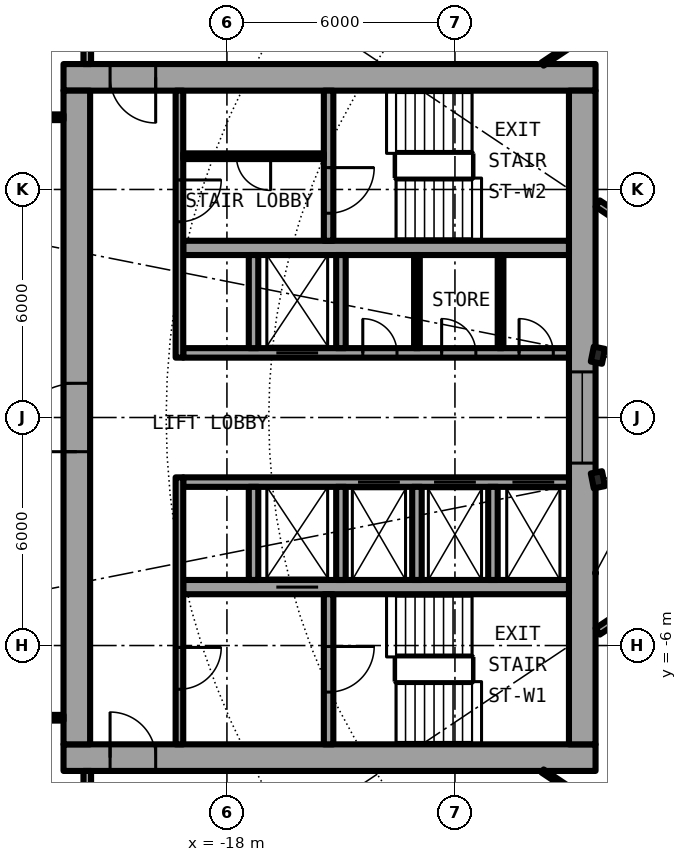
"""IFC4 building model, lengths in metres.
Left out: names, types, materials, properties, quantities, classifications, styles, units other than length and angle.
Written with IfcOpenShell. Run it as: python <this file> out.ifc"""

import sys

from ifc_helpers import new_model, si_unit, direction, frame, frame_2d, origin, origin_2d, place, context, subcontext, project, spatial, rectangle, i_section, extrude, element, fill, save


model = new_model("IFC4")
c1 = context("Model", 3, precision=1e-05, world=origin(), true_north=direction((0.0, 1.0)))
c2 = subcontext(c1, "Body", "Model", "MODEL_VIEW")
j1 = project(units=[si_unit("LENGTHUNIT", "METRE"), si_unit("PLANEANGLEUNIT", "RADIAN")], contexts=[c1])
p1 = place(None, origin())
s1 = spatial("IfcSite", under=j1, at=p1, CompositionType="ELEMENT")
p2 = place(p1, origin())
s2 = spatial("IfcBuilding", under=s1, at=p2, CompositionType="ELEMENT")
p3 = place(p2, frame((0.0, 0.0, 91.05)))
s3 = spatial("IfcBuildingStorey", under=s2, at=p3, CompositionType="ELEMENT", Elevation=91.05)
for number, where, z_axis, x_axis in (
    (1, (-8.239, 1.639, 0.0), (0.0, 0.0, 1.0), (-0.981, 0.195, 0.0)),
    (2, (-8.239, -1.639, 0.0), (0.0, 0.0, 1.0), (-0.981, -0.195, 0.0)),
):
    element("IfcColumn", number, at=place(p3, frame(where, z_axis=z_axis, x_axis=x_axis)), inside=s3, PredefinedType="COLUMN", context=c2, shape_type="SweptSolid", body=[
        extrude(i_section(OverallWidth=0.3, OverallDepth=0.4, WebThickness=0.013, FlangeThickness=0.024, FilletRadius=0.027, at=origin_2d()), origin(), (0.0, 0.0, 1.0), 3.05),
    ])
p4 = place(p3, frame((-22.3, -8.95, 0.0), z_axis=(0.0, 0.0, 1.0), x_axis=(1.0, 0.0, 0.0)))
e3 = element("IfcWall", 3, at=p4, inside=s3, PredefinedType="SHEAR", context=c2, shape_type="SweptSolid", body=[
    extrude(rectangle(XDim=14.0, YDim=0.7, at=frame_2d((7.0, 0.0))), origin(), (0.0, 0.0, 1.0), 3.05),
])
p5 = place(p4, frame((1.225, 0.0, 0.0)))
e4 = element("IfcOpeningElement", 4, at=p5, cuts=e3, PredefinedType="OPENING", context=c2, shape_type="SweptSolid", body=[
    extrude(rectangle(XDim=1.2, YDim=2.3, at=frame_2d((0.6, 1.15))), frame((0.0, 0.36, 0.0), z_axis=(0.0, -1.0, 0.0), x_axis=(1.0, 0.0, 0.0)), (0.0, 0.0, 1.0), 0.72),
])
p6 = place(p3, frame((-8.3, 8.95, 0.0), z_axis=(0.0, 0.0, 1.0), x_axis=(-1.0, 0.0, 0.0)))
e5 = element("IfcWall", 5, at=p6, inside=s3, PredefinedType="SHEAR", context=c2, shape_type="SweptSolid", body=[
    extrude(rectangle(XDim=14.0, YDim=0.7, at=frame_2d((7.0, 0.0))), origin(), (0.0, 0.0, 1.0), 3.05),
])
p7 = place(p6, frame((11.575, 0.0, 0.0)))
e6 = element("IfcOpeningElement", 6, at=p7, cuts=e5, PredefinedType="OPENING", context=c2, shape_type="SweptSolid", body=[
    extrude(rectangle(XDim=1.2, YDim=2.3, at=frame_2d((0.6, 1.15))), frame((0.0, 0.36, 0.0), z_axis=(0.0, -1.0, 0.0), x_axis=(1.0, 0.0, 0.0)), (0.0, 0.0, 1.0), 0.72),
])
p8 = place(p3, frame((-21.95, -8.6, 0.0), z_axis=(0.0, 0.0, 1.0), x_axis=(0.0, 1.0, 0.0)))
e7 = element("IfcWall", 7, at=p8, inside=s3, PredefinedType="SHEAR", context=c2, shape_type="SweptSolid", body=[
    extrude(rectangle(XDim=17.2, YDim=0.7, at=frame_2d((8.6, 0.0))), origin(), (0.0, 0.0, 1.0), 3.05),
])
p9 = place(p8, frame((7.7, 0.0, 0.0)))
e8 = element("IfcOpeningElement", 8, at=p9, cuts=e7, PredefinedType="OPENING", context=c2, shape_type="SweptSolid", body=[
    extrude(rectangle(XDim=1.8, YDim=2.3, at=frame_2d((0.9, 1.15))), frame((0.0, 0.36, 0.0), z_axis=(0.0, -1.0, 0.0), x_axis=(1.0, 0.0, 0.0)), (0.0, 0.0, 1.0), 0.72),
])
p10 = place(p3, frame((-8.65, 8.6, 0.0), z_axis=(0.0, 0.0, 1.0), x_axis=(0.0, -1.0, 0.0)))
e9 = element("IfcWall", 9, at=p10, inside=s3, PredefinedType="SHEAR", context=c2, shape_type="SweptSolid", body=[
    extrude(rectangle(XDim=17.2, YDim=0.7, at=frame_2d((8.6, 0.0))), origin(), (0.0, 0.0, 1.0), 3.05),
])
p11 = place(p10, frame((7.4, 0.0, 0.1)))
e10 = element("IfcOpeningElement", 10, at=p11, cuts=e9, PredefinedType="OPENING", context=c2, shape_type="SweptSolid", body=[
    extrude(rectangle(XDim=2.4, YDim=2.2, at=frame_2d((1.2, 1.1))), frame((0.0, 0.36, 0.0), z_axis=(0.0, -1.0, 0.0), x_axis=(1.0, 0.0, 0.0)), (0.0, 0.0, 1.0), 0.72),
])
p12 = place(p3, frame((-9.0, -1.7, 0.0), z_axis=(0.0, 0.0, 1.0), x_axis=(-1.0, 0.0, 0.0)))
e11 = element("IfcWall", 11, at=p12, inside=s3, PredefinedType="SHEAR", context=c2, shape_type="SweptSolid", body=[
    extrude(rectangle(XDim=10.15, YDim=0.25, at=frame_2d((5.075, 0.0))), origin(), (0.0, 0.0, 1.0), 3.05),
])
p13 = place(p12, frame((0.387, 0.0, 0.0)))
e12 = element("IfcOpeningElement", 12, at=p13, cuts=e11, PredefinedType="OPENING", context=c2, shape_type="SweptSolid", body=[
    extrude(rectangle(XDim=1.1, YDim=2.3, at=frame_2d((0.55, 1.15))), frame((0.0, 0.135, 0.0), z_axis=(0.0, -1.0, 0.0), x_axis=(1.0, 0.0, 0.0)), (0.0, 0.0, 1.0), 0.27),
])
p14 = place(p12, frame((2.45, 0.0, 0.0)))
e13 = element("IfcOpeningElement", 13, at=p14, cuts=e11, PredefinedType="OPENING", context=c2, shape_type="SweptSolid", body=[
    extrude(rectangle(XDim=1.1, YDim=2.3, at=frame_2d((0.55, 1.15))), frame((0.0, 0.135, 0.0), z_axis=(0.0, -1.0, 0.0), x_axis=(1.0, 0.0, 0.0)), (0.0, 0.0, 1.0), 0.27),
])
p15 = place(p12, frame((4.45, 0.0, 0.0)))
e14 = element("IfcOpeningElement", 14, at=p15, cuts=e11, PredefinedType="OPENING", context=c2, shape_type="SweptSolid", body=[
    extrude(rectangle(XDim=1.1, YDim=2.3, at=frame_2d((0.55, 1.15))), frame((0.0, 0.135, 0.0), z_axis=(0.0, -1.0, 0.0), x_axis=(1.0, 0.0, 0.0)), (0.0, 0.0, 1.0), 0.27),
])
p16 = place(p3, frame((-9.0, -4.462, 0.0), z_axis=(0.0, 0.0, 1.0), x_axis=(-1.0, 0.0, 0.0)))
e15 = element("IfcWall", 15, at=p16, inside=s3, PredefinedType="SHEAR", context=c2, shape_type="SweptSolid", body=[
    extrude(rectangle(XDim=10.15, YDim=0.375, at=frame_2d((5.075, 0.0))), origin(), (0.0, 0.0, 1.0), 3.05),
])
p17 = place(p16, frame((6.6, 0.0, 0.0)))
e16 = element("IfcOpeningElement", 16, at=p17, cuts=e15, PredefinedType="OPENING", context=c2, shape_type="SweptSolid", body=[
    extrude(rectangle(XDim=1.1, YDim=2.3, at=frame_2d((0.55, 1.15))), frame((0.0, 0.198, 0.0), z_axis=(0.0, -1.0, 0.0), x_axis=(1.0, 0.0, 0.0)), (0.0, 0.0, 1.0), 0.395),
])
p18 = place(p3, frame((-15.325, -4.65, 0.0), z_axis=(0.0, 0.0, 1.0), x_axis=(0.0, -1.0, 0.0)))
e17 = element("IfcWall", 17, at=p18, inside=s3, PredefinedType="SHEAR", context=c2, shape_type="SweptSolid", body=[
    extrude(rectangle(XDim=3.95, YDim=0.25, at=frame_2d((1.975, 0.0))), origin(), (0.0, 0.0, 1.0), 3.05),
])
p19 = place(p18, frame((1.375, 0.0, 0.0)))
e18 = element("IfcOpeningElement", 18, at=p19, cuts=e17, PredefinedType="OPENING", context=c2, shape_type="SweptSolid", body=[
    extrude(rectangle(XDim=1.2, YDim=2.3, at=frame_2d((0.6, 1.15))), frame((0.0, 0.135, 0.0), z_axis=(0.0, -1.0, 0.0), x_axis=(1.0, 0.0, 0.0)), (0.0, 0.0, 1.0), 0.27),
])
for number, where, z_axis, x_axis in (
    (19, (-15.0, -1.825, 0.0), (0.0, 0.0, 1.0), (0.0, -1.0, 0.0)),
    (20, (-17.3, -1.825, 0.0), (0.0, 0.0, 1.0), (0.0, -1.0, 0.0)),
):
    element("IfcWall", number, at=place(p3, frame(where, z_axis=z_axis, x_axis=x_axis)), inside=s3, PredefinedType="SOLIDWALL", context=c2, shape_type="SweptSolid", body=[
        extrude(rectangle(XDim=2.45, YDim=0.25, at=frame_2d((1.225, 0.0))), origin(), (0.0, 0.0, 1.0), 2.7),
    ])
p20 = place(p3, frame((-19.25, -1.575, 0.0), z_axis=(0.0, 0.0, 1.0), x_axis=(0.0, -1.0, 0.0)))
e21 = element("IfcWall", 21, at=p20, inside=s3, PredefinedType="SOLIDWALL", context=c2, shape_type="SweptSolid", body=[
    extrude(rectangle(XDim=7.025, YDim=0.2, at=frame_2d((3.513, 0.0))), origin(), (0.0, 0.0, 1.0), 2.7),
])
p21 = place(p20, frame((4.475, 0.0, 0.0)))
e22 = element("IfcOpeningElement", 22, at=p21, cuts=e21, PredefinedType="OPENING", context=c2, shape_type="SweptSolid", body=[
    extrude(rectangle(XDim=1.1, YDim=2.3, at=frame_2d((0.55, 1.15))), frame((0.0, 0.11, 0.0), z_axis=(0.0, -1.0, 0.0), x_axis=(1.0, 0.0, 0.0)), (0.0, 0.0, 1.0), 0.22),
])
p22 = place(p3, frame((-19.15, 1.7, 0.0), z_axis=(0.0, 0.0, 1.0), x_axis=(1.0, 0.0, 0.0)))
e23 = element("IfcWall", 23, at=p22, inside=s3, PredefinedType="SHEAR", context=c2, shape_type="SweptSolid", body=[
    extrude(rectangle(XDim=10.15, YDim=0.25, at=frame_2d((5.075, 0.0))), origin(), (0.0, 0.0, 1.0), 3.05),
])
p23 = place(p22, frame((2.45, 0.0, 0.0)))
e24 = element("IfcOpeningElement", 24, at=p23, cuts=e23, PredefinedType="OPENING", context=c2, shape_type="SweptSolid", body=[
    extrude(rectangle(XDim=1.1, YDim=2.3, at=frame_2d((0.55, 1.15))), frame((0.0, 0.135, 0.0), z_axis=(0.0, -1.0, 0.0), x_axis=(1.0, 0.0, 0.0)), (0.0, 0.0, 1.0), 0.27),
])
p24 = place(p22, frame((8.837, 0.0, 0.0)))
e25 = element("IfcOpeningElement", 25, at=p24, cuts=e23, PredefinedType="OPENING", context=c2, shape_type="SweptSolid", body=[
    extrude(rectangle(XDim=0.9, YDim=2.3, at=frame_2d((0.45, 1.15))), frame((0.0, 0.135, 0.0), z_axis=(0.0, -1.0, 0.0), x_axis=(1.0, 0.0, 0.0)), (0.0, 0.0, 1.0), 0.27),
])
p25 = place(p22, frame((6.8, 0.0, 0.0)))
e26 = element("IfcOpeningElement", 26, at=p25, cuts=e23, PredefinedType="OPENING", context=c2, shape_type="SweptSolid", body=[
    extrude(rectangle(XDim=0.9, YDim=2.3, at=frame_2d((0.45, 1.15))), frame((0.0, 0.135, 0.0), z_axis=(0.0, -1.0, 0.0), x_axis=(1.0, 0.0, 0.0)), (0.0, 0.0, 1.0), 0.27),
])
p26 = place(p22, frame((4.725, 0.0, 0.0)))
e27 = element("IfcOpeningElement", 27, at=p26, cuts=e23, PredefinedType="OPENING", context=c2, shape_type="SweptSolid", body=[
    extrude(rectangle(XDim=0.9, YDim=2.3, at=frame_2d((0.45, 1.15))), frame((0.0, 0.135, 0.0), z_axis=(0.0, -1.0, 0.0), x_axis=(1.0, 0.0, 0.0)), (0.0, 0.0, 1.0), 0.27),
])
p27 = place(p3, frame((-9.0, 4.462, 0.0), z_axis=(0.0, 0.0, 1.0), x_axis=(-1.0, 0.0, 0.0)))
e28 = element("IfcWall", 28, at=p27, inside=s3, PredefinedType="SHEAR", context=c2, shape_type="SweptSolid", body=[
    extrude(rectangle(XDim=10.15, YDim=0.375, at=frame_2d((5.075, 0.0))), origin(), (0.0, 0.0, 1.0), 3.05),
])
p28 = place(p3, frame((-15.325, 8.6, 0.0), z_axis=(0.0, 0.0, 1.0), x_axis=(0.0, -1.0, 0.0)))
e29 = element("IfcWall", 29, at=p28, inside=s3, PredefinedType="SHEAR", context=c2, shape_type="SweptSolid", body=[
    extrude(rectangle(XDim=3.95, YDim=0.25, at=frame_2d((1.975, 0.0))), origin(), (0.0, 0.0, 1.0), 3.05),
])
p29 = place(p28, frame((2.025, 0.0, 0.0)))
e30 = element("IfcOpeningElement", 30, at=p29, cuts=e29, PredefinedType="OPENING", context=c2, shape_type="SweptSolid", body=[
    extrude(rectangle(XDim=1.2, YDim=2.3, at=frame_2d((0.6, 1.15))), frame((0.0, 0.135, 0.0), z_axis=(0.0, -1.0, 0.0), x_axis=(1.0, 0.0, 0.0)), (0.0, 0.0, 1.0), 0.27),
])
for number, where, z_axis, x_axis in (
    (31, (-15.0, 1.825, 0.0), (0.0, 0.0, 1.0), (0.0, 1.0, 0.0)),
    (32, (-17.3, 1.825, 0.0), (0.0, 0.0, 1.0), (0.0, 1.0, 0.0)),
):
    element("IfcWall", number, at=place(p3, frame(where, z_axis=z_axis, x_axis=x_axis)), inside=s3, PredefinedType="SOLIDWALL", context=c2, shape_type="SweptSolid", body=[
        extrude(rectangle(XDim=2.45, YDim=0.25, at=frame_2d((1.225, 0.0))), origin(), (0.0, 0.0, 1.0), 2.7),
    ])
p30 = place(p3, frame((-19.25, 8.6, 0.0), z_axis=(0.0, 0.0, 1.0), x_axis=(0.0, -1.0, 0.0)))
e33 = element("IfcWall", 33, at=p30, inside=s3, PredefinedType="SOLIDWALL", context=c2, shape_type="SweptSolid", body=[
    extrude(rectangle(XDim=7.025, YDim=0.2, at=frame_2d((3.513, 0.0))), origin(), (0.0, 0.0, 1.0), 2.7),
])
p31 = place(p30, frame((2.35, 0.0, 0.0)))
e34 = element("IfcOpeningElement", 34, at=p31, cuts=e33, PredefinedType="OPENING", context=c2, shape_type="SweptSolid", body=[
    extrude(rectangle(XDim=1.1, YDim=2.3, at=frame_2d((0.55, 1.15))), frame((0.0, 0.11, 0.0), z_axis=(0.0, -1.0, 0.0), x_axis=(1.0, 0.0, 0.0)), (0.0, 0.0, 1.0), 0.22),
])
for number, where, z_axis, x_axis in (
    (35, (-11.0, -1.825, 0.0), (0.0, 0.0, 1.0), (0.0, -1.0, 0.0)),
    (36, (-13.0, -1.825, 0.0), (0.0, 0.0, 1.0), (0.0, -1.0, 0.0)),
):
    element("IfcWall", number, at=place(p3, frame(where, z_axis=z_axis, x_axis=x_axis)), inside=s3, PredefinedType="SOLIDWALL", context=c2, shape_type="SweptSolid", body=[
        extrude(rectangle(XDim=2.45, YDim=0.25, at=frame_2d((1.225, 0.0))), origin(), (0.0, 0.0, 1.0), 2.7),
    ])
for number, where, z_axis, x_axis in (
    (37, (-10.8, 1.825, 0.0), (0.0, 0.0, 1.0), (0.0, 1.0, 0.0)),
    (38, (-13.0, 1.825, 0.0), (0.0, 0.0, 1.0), (0.0, 1.0, 0.0)),
):
    element("IfcWall", number, at=place(p3, frame(where, z_axis=z_axis, x_axis=x_axis)), inside=s3, PredefinedType="PARTITIONING", context=c2, shape_type="SweptSolid", body=[
        extrude(rectangle(XDim=2.45, YDim=0.15, at=frame_2d((1.225, 0.0))), origin(), (0.0, 0.0, 1.0), 2.7),
    ])
p32 = place(p3, frame((-15.45, 6.875, 0.0), z_axis=(0.0, 0.0, 1.0), x_axis=(-1.0, 0.0, 0.0)))
e39 = element("IfcWall", 39, at=p32, inside=s3, PredefinedType="PARTITIONING", context=c2, shape_type="SweptSolid", body=[
    extrude(rectangle(XDim=3.7, YDim=0.15, at=frame_2d((1.85, 0.0))), origin(), (0.0, 0.0, 1.0), 2.7),
])
p33 = place(p32, frame((1.4, 0.0, 0.0)))
e40 = element("IfcOpeningElement", 40, at=p33, cuts=e39, PredefinedType="OPENING", context=c2, shape_type="SweptSolid", body=[
    extrude(rectangle(XDim=0.9, YDim=2.3, at=frame_2d((0.45, 1.15))), frame((0.0, 0.085, 0.0), z_axis=(0.0, -1.0, 0.0), x_axis=(1.0, 0.0, 0.0)), (0.0, 0.0, 1.0), 0.17),
])
for number, where, z_axis, x_axis in (
    (41, (-22.3, 7.9, 0.0), (0.0, 0.0, 1.0), (-1.0, 0.0, 0.0)),
    (42, (-22.3, -7.9, 0.0), (0.0, 0.0, 1.0), (-1.0, 0.0, 0.0)),
):
    element("IfcWall", number, at=place(p3, frame(where, z_axis=z_axis, x_axis=x_axis)), inside=s3, PredefinedType="PARTITIONING", context=c2, shape_type="SweptSolid", body=[
        extrude(rectangle(XDim=2.64, YDim=0.15, at=frame_2d((1.32, 0.0))), origin(), (0.0, 0.0, 1.0), 2.7),
    ])
p34 = place(p3, frame((-9.693, -9.302, 0.0), z_axis=(0.0, 0.0, 1.0), x_axis=(0.831546497949, -0.555455148278, 0.0)))
e43 = element("IfcWall", 43, at=p34, inside=s3, PredefinedType="PARTITIONING", context=c2, shape_type="SweptSolid", body=[
    extrude(rectangle(XDim=4.252, YDim=0.1, at=frame_2d((2.126, 0.0))), origin(), (0.0, 0.0, 1.0), 2.7),
])
for number, where, z_axis, x_axis in (
    (44, (-6.513, -4.472, 0.0), (0.0, 0.0, 1.0), (-0.831, -0.556, 0.0)),
    (45, (-6.513, 4.472, 0.0), (0.0, 0.0, 1.0), (-0.831, 0.556, 0.0)),
):
    element("IfcWall", number, at=place(p3, frame(where, z_axis=z_axis, x_axis=x_axis)), inside=s3, PredefinedType="PARTITIONING", context=c2, shape_type="SweptSolid", body=[
        extrude(rectangle(XDim=2.082, YDim=0.2, at=frame_2d((1.041, 0.0))), origin(), (0.0, 0.0, 1.0), 2.7),
    ])
p35 = place(p3, frame((-9.695, 9.3, 0.0), z_axis=(0.0, 0.0, 1.0), x_axis=(0.831369521678, 0.555720000022, 0.0)))
e46 = element("IfcWall", 46, at=p35, inside=s3, PredefinedType="PARTITIONING", context=c2, shape_type="SweptSolid", body=[
    extrude(rectangle(XDim=4.252, YDim=0.1, at=frame_2d((2.126, 0.0))), origin(), (0.0, 0.0, 1.0), 2.7),
])
for number, where, z_axis, x_axis in (
    (47, (-21.675, -10.95, 0.0), (0.0, 0.0, 1.0), (0.0, 1.0, 0.0)),
    (48, (-21.675, 9.3, 0.0), (0.0, 0.0, 1.0), (0.0, 1.0, 0.0)),
):
    element("IfcWall", number, at=place(p3, frame(where, z_axis=z_axis, x_axis=x_axis)), inside=s3, PredefinedType="PARTITIONING", context=c2, shape_type="SweptSolid", body=[
        extrude(rectangle(XDim=1.65, YDim=0.2, at=frame_2d((0.825, 0.0))), origin(), (0.0, 0.0, 1.0), 2.7),
    ])
p36 = place(p13, origin())
e49 = element("IfcDoor", 49, at=p36, inside=s3, OperationType="DOUBLE_DOOR_SLIDING", PredefinedType="DOOR", context=c2, shape_type="SweptSolid", body=[
    extrude(rectangle(XDim=1.1, YDim=2.3, at=frame_2d((0.55, 1.15))), frame((0.0, 0.025, 0.0), z_axis=(0.0, -1.0, 0.0), x_axis=(1.0, 0.0, 0.0)), (0.0, 0.0, 1.0), 0.05),
])
fill(e12, e49)
p37 = place(p14, origin())
e50 = element("IfcDoor", 50, at=p37, inside=s3, OperationType="DOUBLE_DOOR_SLIDING", PredefinedType="DOOR", context=c2, shape_type="SweptSolid", body=[
    extrude(rectangle(XDim=1.1, YDim=2.3, at=frame_2d((0.55, 1.15))), frame((0.0, 0.025, 0.0), z_axis=(0.0, -1.0, 0.0), x_axis=(1.0, 0.0, 0.0)), (0.0, 0.0, 1.0), 0.05),
])
fill(e13, e50)
p38 = place(p15, origin())
e51 = element("IfcDoor", 51, at=p38, inside=s3, OperationType="DOUBLE_DOOR_SLIDING", PredefinedType="DOOR", context=c2, shape_type="SweptSolid", body=[
    extrude(rectangle(XDim=1.1, YDim=2.3, at=frame_2d((0.55, 1.15))), frame((0.0, 0.025, 0.0), z_axis=(0.0, -1.0, 0.0), x_axis=(1.0, 0.0, 0.0)), (0.0, 0.0, 1.0), 0.05),
])
fill(e14, e51)
p39 = place(p17, origin())
e52 = element("IfcDoor", 52, at=p39, inside=s3, OperationType="DOUBLE_DOOR_SLIDING", PredefinedType="DOOR", context=c2, shape_type="SweptSolid", body=[
    extrude(rectangle(XDim=1.1, YDim=2.3, at=frame_2d((0.55, 1.15))), frame((0.0, 0.025, 0.0), z_axis=(0.0, -1.0, 0.0), x_axis=(1.0, 0.0, 0.0)), (0.0, 0.0, 1.0), 0.05),
])
fill(e16, e52)
p40 = place(p23, origin())
e53 = element("IfcDoor", 53, at=p40, inside=s3, OperationType="DOUBLE_DOOR_SLIDING", PredefinedType="DOOR", context=c2, shape_type="SweptSolid", body=[
    extrude(rectangle(XDim=1.1, YDim=2.3, at=frame_2d((0.55, 1.15))), frame((0.0, 0.025, 0.0), z_axis=(0.0, -1.0, 0.0), x_axis=(1.0, 0.0, 0.0)), (0.0, 0.0, 1.0), 0.05),
])
fill(e24, e53)
p41 = place(p24, origin())
e54 = element("IfcDoor", 54, at=p41, inside=s3, OperationType="SINGLE_SWING_LEFT", PredefinedType="DOOR", context=c2, shape_type="SweptSolid", body=[
    extrude(rectangle(XDim=0.9, YDim=2.3, at=frame_2d((0.45, 1.15))), frame((0.0, 0.025, 0.0), z_axis=(0.0, -1.0, 0.0), x_axis=(1.0, 0.0, 0.0)), (0.0, 0.0, 1.0), 0.05),
])
fill(e25, e54)
p42 = place(p25, origin())
e55 = element("IfcDoor", 55, at=p42, inside=s3, OperationType="SINGLE_SWING_LEFT", PredefinedType="DOOR", context=c2, shape_type="SweptSolid", body=[
    extrude(rectangle(XDim=0.9, YDim=2.3, at=frame_2d((0.45, 1.15))), frame((0.0, 0.025, 0.0), z_axis=(0.0, -1.0, 0.0), x_axis=(1.0, 0.0, 0.0)), (0.0, 0.0, 1.0), 0.05),
])
fill(e26, e55)
p43 = place(p26, origin())
e56 = element("IfcDoor", 56, at=p43, inside=s3, OperationType="SINGLE_SWING_LEFT", PredefinedType="DOOR", context=c2, shape_type="SweptSolid", body=[
    extrude(rectangle(XDim=0.9, YDim=2.3, at=frame_2d((0.45, 1.15))), frame((0.0, 0.025, 0.0), z_axis=(0.0, -1.0, 0.0), x_axis=(1.0, 0.0, 0.0)), (0.0, 0.0, 1.0), 0.05),
])
fill(e27, e56)
p44 = place(p33, origin())
e57 = element("IfcDoor", 57, at=p44, inside=s3, OperationType="SINGLE_SWING_LEFT", PredefinedType="DOOR", context=c2, shape_type="SweptSolid", body=[
    extrude(rectangle(XDim=0.9, YDim=2.3, at=frame_2d((0.45, 1.15))), frame((0.0, 0.025, 0.0), z_axis=(0.0, -1.0, 0.0), x_axis=(1.0, 0.0, 0.0)), (0.0, 0.0, 1.0), 0.05),
])
fill(e40, e57)
p45 = place(p19, origin())
e58 = element("IfcDoor", 58, at=p45, inside=s3, OperationType="SINGLE_SWING_LEFT", PredefinedType="DOOR", context=c2, shape_type="SweptSolid", body=[
    extrude(rectangle(XDim=1.2, YDim=2.3, at=frame_2d((0.6, 1.15))), frame((0.0, 0.025, 0.0), z_axis=(0.0, -1.0, 0.0), x_axis=(1.0, 0.0, 0.0)), (0.0, 0.0, 1.0), 0.05),
])
fill(e18, e58)
p46 = place(p29, origin())
e59 = element("IfcDoor", 59, at=p46, inside=s3, OperationType="SINGLE_SWING_LEFT", PredefinedType="DOOR", context=c2, shape_type="SweptSolid", body=[
    extrude(rectangle(XDim=1.2, YDim=2.3, at=frame_2d((0.6, 1.15))), frame((0.0, 0.025, 0.0), z_axis=(0.0, -1.0, 0.0), x_axis=(1.0, 0.0, 0.0)), (0.0, 0.0, 1.0), 0.05),
])
fill(e30, e59)
p47 = place(p21, origin())
e60 = element("IfcDoor", 60, at=p47, inside=s3, OperationType="SINGLE_SWING_LEFT", PredefinedType="DOOR", context=c2, shape_type="SweptSolid", body=[
    extrude(rectangle(XDim=1.1, YDim=2.3, at=frame_2d((0.55, 1.15))), frame((0.0, 0.025, 0.0), z_axis=(0.0, -1.0, 0.0), x_axis=(1.0, 0.0, 0.0)), (0.0, 0.0, 1.0), 0.05),
])
fill(e22, e60)
p48 = place(p31, origin())
e61 = element("IfcDoor", 61, at=p48, inside=s3, OperationType="SINGLE_SWING_RIGHT", PredefinedType="DOOR", context=c2, shape_type="SweptSolid", body=[
    extrude(rectangle(XDim=1.1, YDim=2.3, at=frame_2d((0.55, 1.15))), frame((0.0, 0.025, 0.0), z_axis=(0.0, -1.0, 0.0), x_axis=(1.0, 0.0, 0.0)), (0.0, 0.0, 1.0), 0.05),
])
fill(e34, e61)
p49 = place(p5, origin())
e62 = element("IfcDoor", 62, at=p49, inside=s3, OperationType="SINGLE_SWING_RIGHT", PredefinedType="DOOR", context=c2, shape_type="SweptSolid", body=[
    extrude(rectangle(XDim=1.2, YDim=2.3, at=frame_2d((0.6, 1.15))), frame((0.0, 0.025, 0.0), z_axis=(0.0, -1.0, 0.0), x_axis=(1.0, 0.0, 0.0)), (0.0, 0.0, 1.0), 0.05),
])
fill(e4, e62)
p50 = place(p7, origin())
e63 = element("IfcDoor", 63, at=p50, inside=s3, OperationType="SINGLE_SWING_LEFT", PredefinedType="DOOR", context=c2, shape_type="SweptSolid", body=[
    extrude(rectangle(XDim=1.2, YDim=2.3, at=frame_2d((0.6, 1.15))), frame((0.0, 0.025, 0.0), z_axis=(0.0, -1.0, 0.0), x_axis=(1.0, 0.0, 0.0)), (0.0, 0.0, 1.0), 0.05),
])
fill(e6, e63)
p51 = place(p9, origin())
e64 = element("IfcDoor", 64, at=p51, inside=s3, OperationType="SINGLE_SWING_LEFT", PredefinedType="DOOR", context=c2, shape_type="SweptSolid", body=[
    extrude(rectangle(XDim=1.8, YDim=2.3, at=frame_2d((0.9, 1.15))), frame((0.0, 0.025, 0.0), z_axis=(0.0, -1.0, 0.0), x_axis=(1.0, 0.0, 0.0)), (0.0, 0.0, 1.0), 0.05),
])
fill(e8, e64)
p52 = place(p11, origin())
e65 = element("IfcWindow", 65, at=p52, inside=s3, PartitioningType="SINGLE_PANEL", PredefinedType="WINDOW", context=c2, shape_type="SweptSolid", body=[
    extrude(rectangle(XDim=2.4, YDim=2.2, at=frame_2d((1.2, 1.1))), frame((0.0, 0.03, 0.0), z_axis=(0.0, -1.0, 0.0), x_axis=(1.0, 0.0, 0.0)), (0.0, 0.0, 1.0), 0.06),
])
fill(e10, e65)
save(model, sys.argv[1])
